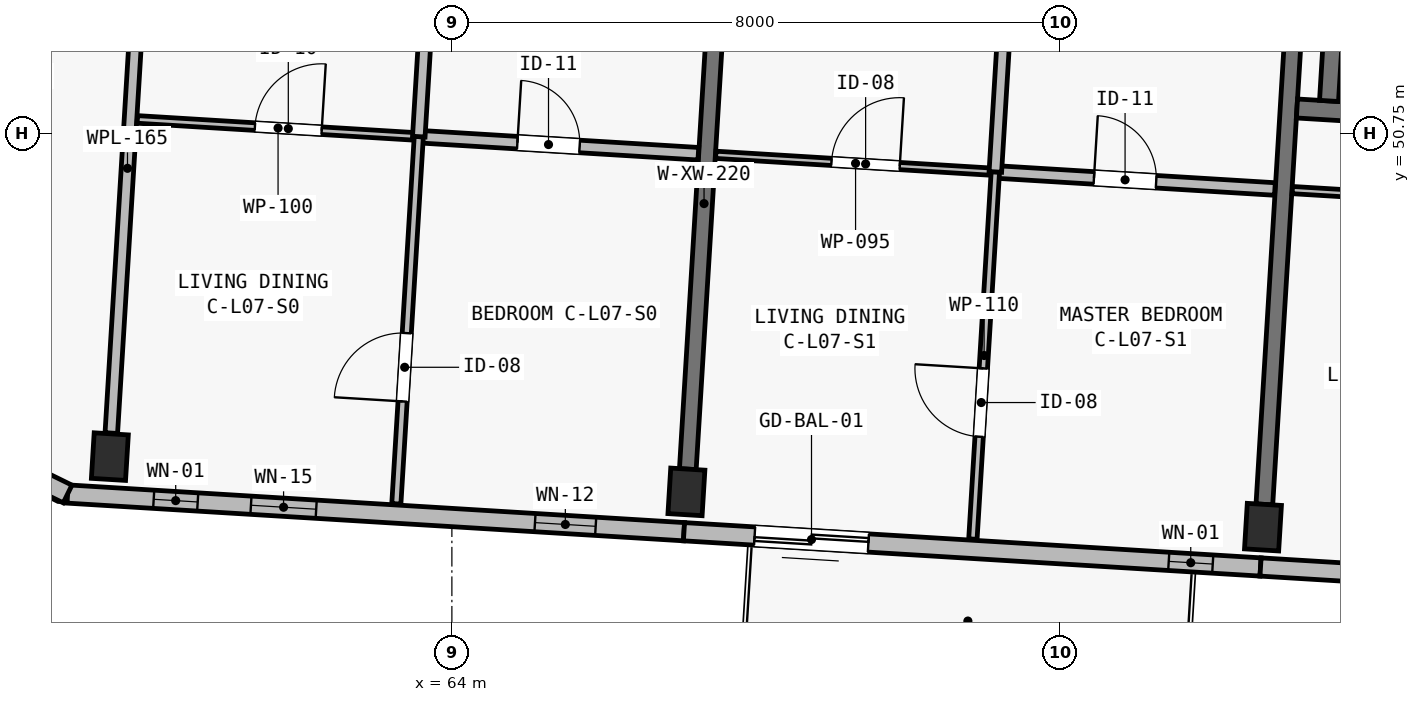
"""IFC4 building model, lengths in metres.
Left out: names, types, materials, properties, quantities, classifications, styles, units other than length and angle.
Written with IfcOpenShell. Run it as: python <this file> out.ifc"""

import sys

from ifc_helpers import new_model, si_unit, direction, frame, frame_2d, origin, origin_2d, place, context, subcontext, project, spatial, rectangle, extrude, element, fill, save


model = new_model("IFC4")
c1 = context("Model", 3, precision=1e-05, world=origin(), true_north=direction((0.0, 1.0)))
c2 = subcontext(c1, "Body", "Model", "MODEL_VIEW")
j1 = project(units=[si_unit("LENGTHUNIT", "METRE"), si_unit("PLANEANGLEUNIT", "RADIAN")], contexts=[c1])
p1 = place(None, origin())
s1 = spatial("IfcSite", under=j1, at=p1, CompositionType="ELEMENT")
p2 = place(p1, origin())
s2 = spatial("IfcBuilding", under=s1, at=p2, CompositionType="ELEMENT")
p3 = place(p2, frame((0.0, 0.0, 24.65)))
s3 = spatial("IfcBuildingStorey", under=s2, at=p3, CompositionType="ELEMENT", Elevation=24.65)
for number, where, z_axis, x_axis in (
    (1, (59.5, 46.5, 0.0), (0.0, 0.0, 1.0), (0.998, -0.061, 0.0)),
    (2, (67.086, 46.036, 0.0), (0.0, 0.0, 1.0), (0.998, -0.061, 0.0)),
    (3, (74.672, 45.572, 0.0), (0.0, 0.0, 1.0), (0.998, -0.061, 0.0)),
):
    element("IfcColumn", number, at=place(p3, frame(where, z_axis=z_axis, x_axis=x_axis)), inside=s3, PredefinedType="COLUMN", context=c2, shape_type="SweptSolid", body=[
        extrude(rectangle(XDim=0.45, YDim=0.6, at=origin_2d()), origin(), (0.0, 0.0, 1.0), 3.25),
    ])
p4 = place(p3, frame((67.104, 46.335, 0.0), z_axis=(0.0, 0.0, 1.0), x_axis=(0.061034188237, 0.998135676081, 0.0)))
e4 = element("IfcWall", 4, at=p4, inside=s3, PredefinedType="SHEAR", context=c2, shape_type="SweptSolid", body=[
    extrude(rectangle(XDim=7.0, YDim=0.22, at=frame_2d((3.5, 0.0))), origin(), (0.0, 0.0, 1.0), 2.5),
])
p5 = place(p3, frame((74.69, 45.872, 0.0), z_axis=(0.0, 0.0, 1.0), x_axis=(0.061036313012, 0.998135546153, 0.0)))
e5 = element("IfcWall", 5, at=p5, inside=s3, PredefinedType="SHEAR", context=c2, shape_type="SweptSolid", body=[
    extrude(rectangle(XDim=7.0, YDim=0.22, at=frame_2d((3.5, 0.0))), origin(), (0.0, 0.0, 1.0), 2.5),
])
p6 = place(p3, frame((75.119, 51.08, 0.0), z_axis=(0.0, 0.0, 1.0), x_axis=(0.998133370443, -0.061071882298, 0.0)))
e6 = element("IfcWall", 6, at=p6, inside=s3, PredefinedType="SHEAR", context=c2, shape_type="SweptSolid", body=[
    extrude(rectangle(XDim=2.99, YDim=0.25, at=frame_2d((1.495, 0.0))), origin(), (0.0, 0.0, 1.0), 3.25),
])
p7 = place(p3, frame((75.541, 51.179, 0.0), z_axis=(0.0, 0.0, 1.0), x_axis=(0.061037062968, 0.998135500293, 0.0)))
e7 = element("IfcWall", 7, at=p7, inside=s3, PredefinedType="SHEAR", context=c2, shape_type="SweptSolid", body=[
    extrude(rectangle(XDim=1.7, YDim=0.25, at=frame_2d((0.85, 0.0))), origin(), (0.0, 0.0, 1.0), 3.25),
])
p8 = place(p3, frame((67.054, 45.512, 0.0), z_axis=(0.0, 0.0, 1.0), x_axis=(-0.998134248939, 0.061057522844, 0.0)))
e8 = element("IfcWall", 8, at=p8, inside=s3, PredefinedType="SOLIDWALL", context=c2, shape_type="SweptSolid", body=[
    extrude(rectangle(XDim=8.125, YDim=0.24, at=frame_2d((4.062, 0.0))), origin(), (0.0, 0.0, 1.0), 3.0),
])
p9 = place(p8, frame((1.164, 0.0, 0.48)))
e9 = element("IfcOpeningElement", 9, at=p9, cuts=e8, PredefinedType="OPENING", context=c2, shape_type="SweptSolid", body=[
    extrude(rectangle(XDim=0.8, YDim=2.3, at=frame_2d((0.4, 1.15))), frame((0.0, 0.135, 0.0), z_axis=(0.0, -1.0, 0.0), x_axis=(1.0, 0.0, 0.0)), (0.0, 0.0, 1.0), 0.27),
])
p10 = place(p8, frame((4.848, 0.0, 0.48)))
e10 = element("IfcOpeningElement", 10, at=p10, cuts=e8, PredefinedType="OPENING", context=c2, shape_type="SweptSolid", body=[
    extrude(rectangle(XDim=0.86, YDim=2.36, at=frame_2d((0.43, 1.18))), frame((0.0, 0.135, 0.0), z_axis=(0.0, -1.0, 0.0), x_axis=(1.0, 0.0, 0.0)), (0.0, 0.0, 1.0), 0.27),
])
p11 = place(p8, frame((6.41, 0.0, 0.52)))
e11 = element("IfcOpeningElement", 11, at=p11, cuts=e8, PredefinedType="OPENING", context=c2, shape_type="SweptSolid", body=[
    extrude(rectangle(XDim=0.58, YDim=2.16, at=frame_2d((0.29, 1.08))), frame((0.0, 0.135, 0.0), z_axis=(0.0, -1.0, 0.0), x_axis=(1.0, 0.0, 0.0)), (0.0, 0.0, 1.0), 0.27),
])
p12 = place(p3, frame((74.64, 45.048, 0.0), z_axis=(0.0, 0.0, 1.0), x_axis=(-0.998135669243, 0.061034300063, 0.0)))
e12 = element("IfcWall", 12, at=p12, inside=s3, PredefinedType="SOLIDWALL", context=c2, shape_type="SweptSolid", body=[
    extrude(rectangle(XDim=7.6, YDim=0.24, at=frame_2d((3.8, 0.0))), origin(), (0.0, 0.0, 1.0), 3.0),
])
p13 = place(p12, frame((5.169, 0.0, 0.0)))
e13 = element("IfcOpeningElement", 13, at=p13, cuts=e12, PredefinedType="OPENING", context=c2, shape_type="SweptSolid", body=[
    extrude(rectangle(XDim=1.5, YDim=2.12, at=frame_2d((0.75, 1.06))), frame((0.0, 0.135, 0.0), z_axis=(0.0, -1.0, 0.0), x_axis=(1.0, 0.0, 0.0)), (0.0, 0.0, 1.0), 0.27),
])
p14 = place(p12, frame((0.63, 0.0, 0.5)))
e14 = element("IfcOpeningElement", 14, at=p14, cuts=e12, PredefinedType="OPENING", context=c2, shape_type="SweptSolid", body=[
    extrude(rectangle(XDim=0.58, YDim=2.16, at=frame_2d((0.29, 1.08))), frame((0.0, 0.135, 0.0), z_axis=(0.0, -1.0, 0.0), x_axis=(1.0, 0.0, 0.0)), (0.0, 0.0, 1.0), 0.27),
])
p15 = place(p3, frame((82.225, 44.584, 0.0), z_axis=(0.0, 0.0, 1.0), x_axis=(-0.998133591969, 0.061068261669, 0.0)))
e15 = element("IfcWall", 15, at=p15, inside=s3, PredefinedType="SOLIDWALL", context=c2, shape_type="SweptSolid", body=[
    extrude(rectangle(XDim=7.6, YDim=0.24, at=frame_2d((3.8, 0.0))), origin(), (0.0, 0.0, 1.0), 3.0),
])
p16 = place(p15, frame((0.878, 0.0, 0.42)))
e16 = element("IfcOpeningElement", 16, at=p16, cuts=e15, PredefinedType="OPENING", context=c2, shape_type="SweptSolid", body=[
    extrude(rectangle(XDim=0.7, YDim=2.36, at=frame_2d((0.35, 1.18))), frame((0.0, 0.135, 0.0), z_axis=(0.0, -1.0, 0.0), x_axis=(1.0, 0.0, 0.0)), (0.0, 0.0, 1.0), 0.27),
])
p17 = place(p15, frame((3.247, 0.0, 0.42)))
e17 = element("IfcOpeningElement", 17, at=p17, cuts=e15, PredefinedType="OPENING", context=c2, shape_type="SweptSolid", body=[
    extrude(rectangle(XDim=0.76, YDim=2.34, at=frame_2d((0.38, 1.17))), frame((0.0, 0.135, 0.0), z_axis=(0.0, -1.0, 0.0), x_axis=(1.0, 0.0, 0.0)), (0.0, 0.0, 1.0), 0.27),
])
p18 = place(p3, frame((58.944, 46.008, 0.0), z_axis=(0.0, 0.0, 1.0), x_axis=(-0.897775054318, 0.440454256246, 0.0)))
e18 = element("IfcWall", 18, at=p18, inside=s3, PredefinedType="SOLIDWALL", context=c2, shape_type="SweptSolid", body=[
    extrude(rectangle(XDim=8.12, YDim=0.26, at=frame_2d((4.06, 0.0))), origin(), (0.0, 0.0, 1.0), 3.0),
])
p19 = place(p18, frame((2.99, 0.0, 0.52)))
e19 = element("IfcOpeningElement", 19, at=p19, cuts=e18, PredefinedType="OPENING", context=c2, shape_type="SweptSolid", body=[
    extrude(rectangle(XDim=0.64, YDim=2.18, at=frame_2d((0.32, 1.09))), frame((0.0, 0.145, 0.0), z_axis=(0.0, -1.0, 0.0), x_axis=(1.0, 0.0, 0.0)), (0.0, 0.0, 1.0), 0.29),
])
p20 = place(p18, frame((4.71, 0.0, 0.45)))
e20 = element("IfcOpeningElement", 20, at=p20, cuts=e18, PredefinedType="OPENING", context=c2, shape_type="SweptSolid", body=[
    extrude(rectangle(XDim=0.78, YDim=2.2, at=frame_2d((0.39, 1.1))), frame((0.0, 0.145, 0.0), z_axis=(0.0, -1.0, 0.0), x_axis=(1.0, 0.0, 0.0)), (0.0, 0.0, 1.0), 0.29),
])
p21 = place(p3, frame((51.654, 49.585, 0.0), z_axis=(0.0, 0.0, 1.0), x_axis=(0.448621989068, 0.893721607059, 0.0)))
e21 = element("IfcWall", 21, at=p21, inside=s3, PredefinedType="SOLIDWALL", context=c2, shape_type="SweptSolid", body=[
    extrude(rectangle(XDim=19.061, YDim=0.26, at=frame_2d((9.53, 0.0))), origin(), (0.0, 0.0, 1.0), 3.0),
])
p22 = place(p21, frame((2.99, 0.0, 0.52)))
e22 = element("IfcOpeningElement", 22, at=p22, cuts=e21, PredefinedType="OPENING", context=c2, shape_type="SweptSolid", body=[
    extrude(rectangle(XDim=0.64, YDim=2.18, at=frame_2d((0.32, 1.09))), frame((0.0, 0.145, 0.0), z_axis=(0.0, -1.0, 0.0), x_axis=(1.0, 0.0, 0.0)), (0.0, 0.0, 1.0), 0.29),
])
p23 = place(p21, frame((15.65, 0.0, 0.45)))
e23 = element("IfcOpeningElement", 23, at=p23, cuts=e21, PredefinedType="OPENING", context=c2, shape_type="SweptSolid", body=[
    extrude(rectangle(XDim=0.78, YDim=2.2, at=frame_2d((0.39, 1.1))), frame((0.0, 0.145, 0.0), z_axis=(0.0, -1.0, 0.0), x_axis=(1.0, 0.0, 0.0)), (0.0, 0.0, 1.0), 0.29),
])
p24 = place(p3, frame((59.519, 46.809, 0.0), z_axis=(0.0, 0.0, 1.0), x_axis=(0.061034681366, 0.998135645927, 0.0)))
e24 = element("IfcWall", 24, at=p24, inside=s3, PredefinedType="PLUMBINGWALL", context=c2, shape_type="SweptSolid", body=[
    extrude(rectangle(XDim=6.98, YDim=0.165, at=frame_2d((3.49, 0.0))), origin(), (0.0, 0.0, 1.0), 2.5),
])
p25 = place(p3, frame((59.862, 50.936, 0.0), z_axis=(0.0, 0.0, 1.0), x_axis=(0.998133653934, -0.061067248869, 0.0)))
e25 = element("IfcWall", 25, at=p25, inside=s3, PredefinedType="PARTITIONING", context=c2, shape_type="SweptSolid", body=[
    extrude(rectangle(XDim=3.71, YDim=0.1, at=frame_2d((1.855, 0.0))), origin(), (0.0, 0.0, 1.0), 2.97),
])
p26 = place(p25, frame((1.55, 0.0, 0.0)))
e26 = element("IfcOpeningElement", 26, at=p26, cuts=e25, PredefinedType="OPENING", context=c2, shape_type="SweptSolid", body=[
    extrude(rectangle(XDim=0.88, YDim=2.1, at=frame_2d((0.44, 1.05))), frame((0.0, 0.065, 0.0), z_axis=(0.0, -1.0, 0.0), x_axis=(1.0, 0.0, 0.0)), (0.0, 0.0, 1.0), 0.13),
])
p27 = place(p3, frame((63.565, 50.71, 0.0), z_axis=(0.0, 0.0, 1.0), x_axis=(0.998136472989, -0.061021154439, 0.0)))
e27 = element("IfcWall", 27, at=p27, inside=s3, PredefinedType="PLUMBINGWALL", context=c2, shape_type="SweptSolid", body=[
    extrude(rectangle(XDim=3.685, YDim=0.165, at=frame_2d((1.842, 0.0))), origin(), (0.0, 0.0, 1.0), 2.97),
])
p28 = place(p27, frame((1.3, 0.0, 0.0)))
e28 = element("IfcOpeningElement", 28, at=p28, cuts=e27, PredefinedType="OPENING", context=c2, shape_type="SweptSolid", body=[
    extrude(rectangle(XDim=0.82, YDim=2.08, at=frame_2d((0.41, 1.04))), frame((0.0, 0.097, 0.0), z_axis=(0.0, -1.0, 0.0), x_axis=(1.0, 0.0, 0.0)), (0.0, 0.0, 1.0), 0.195),
])
p29 = place(p3, frame((63.269, 45.879, 0.0), z_axis=(0.0, 0.0, 1.0), x_axis=(0.061084424005, 0.998132602986, 0.0)))
e29 = element("IfcWall", 29, at=p29, inside=s3, PredefinedType="PARTITIONING", context=c2, shape_type="SweptSolid", body=[
    extrude(rectangle(XDim=4.84, YDim=0.12, at=frame_2d((2.42, 0.0))), origin(), (0.0, 0.0, 1.0), 2.97),
])
p30 = place(p29, frame((1.35, 0.0, 0.0)))
e30 = element("IfcOpeningElement", 30, at=p30, cuts=e29, PredefinedType="OPENING", context=c2, shape_type="SweptSolid", body=[
    extrude(rectangle(XDim=0.9, YDim=2.1, at=frame_2d((0.45, 1.05))), frame((0.0, 0.075, 0.0), z_axis=(0.0, -1.0, 0.0), x_axis=(1.0, 0.0, 0.0)), (0.0, 0.0, 1.0), 0.15),
])
p31 = place(p3, frame((63.565, 50.71, 0.0), z_axis=(0.0, 0.0, 1.0), x_axis=(0.06100299582, 0.998137582952, 0.0)))
e31 = element("IfcWall", 31, at=p31, inside=s3, PredefinedType="PLUMBINGWALL", context=c2, shape_type="SweptSolid", body=[
    extrude(rectangle(XDim=3.57, YDim=0.165, at=frame_2d((1.785, 0.0))), origin(), (0.0, 0.0, 1.0), 2.97),
])
p32 = place(p3, frame((67.472, 50.471, 0.0), z_axis=(0.0, 0.0, 1.0), x_axis=(0.998136719672, -0.061017119263, 0.0)))
e32 = element("IfcWall", 32, at=p32, inside=s3, PredefinedType="PARTITIONING", context=c2, shape_type="SweptSolid", body=[
    extrude(rectangle(XDim=3.685, YDim=0.095, at=frame_2d((1.843, 0.0))), origin(), (0.0, 0.0, 1.0), 2.97),
])
p33 = place(p32, frame((1.525, 0.0, 0.0)))
e33 = element("IfcOpeningElement", 33, at=p33, cuts=e32, PredefinedType="OPENING", context=c2, shape_type="SweptSolid", body=[
    extrude(rectangle(XDim=0.9, YDim=2.1, at=frame_2d((0.45, 1.05))), frame((0.0, 0.062, 0.0), z_axis=(0.0, -1.0, 0.0), x_axis=(1.0, 0.0, 0.0)), (0.0, 0.0, 1.0), 0.125),
])
p34 = place(p3, frame((71.15, 50.246, 0.0), z_axis=(0.0, 0.0, 1.0), x_axis=(0.998132682596, -0.061083123148, 0.0)))
e34 = element("IfcWall", 34, at=p34, inside=s3, PredefinedType="PLUMBINGWALL", context=c2, shape_type="SweptSolid", body=[
    extrude(rectangle(XDim=3.685, YDim=0.165, at=frame_2d((1.843, 0.0))), origin(), (0.0, 0.0, 1.0), 2.97),
])
p35 = place(p34, frame((1.3, 0.0, 0.0)))
e35 = element("IfcOpeningElement", 35, at=p35, cuts=e34, PredefinedType="OPENING", context=c2, shape_type="SweptSolid", body=[
    extrude(rectangle(XDim=0.82, YDim=2.08, at=frame_2d((0.41, 1.04))), frame((0.0, 0.097, 0.0), z_axis=(0.0, -1.0, 0.0), x_axis=(1.0, 0.0, 0.0)), (0.0, 0.0, 1.0), 0.195),
])
p36 = place(p3, frame((70.855, 45.415, 0.0), z_axis=(0.0, 0.0, 1.0), x_axis=(0.061034170677, 0.998135677155, 0.0)))
e36 = element("IfcWall", 36, at=p36, inside=s3, PredefinedType="PARTITIONING", context=c2, shape_type="SweptSolid", body=[
    extrude(rectangle(XDim=4.84, YDim=0.11, at=frame_2d((2.42, 0.0))), origin(), (0.0, 0.0, 1.0), 2.97),
])
p37 = place(p36, frame((1.35, 0.0, 0.0)))
e37 = element("IfcOpeningElement", 37, at=p37, cuts=e36, PredefinedType="OPENING", context=c2, shape_type="SweptSolid", body=[
    extrude(rectangle(XDim=0.9, YDim=2.1, at=frame_2d((0.45, 1.05))), frame((0.0, 0.07, 0.0), z_axis=(0.0, -1.0, 0.0), x_axis=(1.0, 0.0, 0.0)), (0.0, 0.0, 1.0), 0.14),
])
p38 = place(p3, frame((71.15, 50.246, 0.0), z_axis=(0.0, 0.0, 1.0), x_axis=(0.061071129902, 0.998133416479, 0.0)))
e38 = element("IfcWall", 38, at=p38, inside=s3, PredefinedType="PLUMBINGWALL", context=c2, shape_type="SweptSolid", body=[
    extrude(rectangle(XDim=3.57, YDim=0.165, at=frame_2d((1.785, 0.0))), origin(), (0.0, 0.0, 1.0), 2.97),
])
p39 = place(p3, frame((75.058, 50.007, 0.0), z_axis=(0.0, 0.0, 1.0), x_axis=(0.998132708268, -0.061082703655, 0.0)))
e39 = element("IfcWall", 39, at=p39, inside=s3, PredefinedType="PARTITIONING", context=c2, shape_type="SweptSolid", body=[
    extrude(rectangle(XDim=5.08, YDim=0.095, at=frame_2d((2.54, 0.0))), origin(), (0.0, 0.0, 1.0), 2.97),
])
p40 = place(p39, frame((3.595, 0.0, 0.0)))
e40 = element("IfcOpeningElement", 40, at=p40, cuts=e39, PredefinedType="OPENING", context=c2, shape_type="SweptSolid", body=[
    extrude(rectangle(XDim=0.9, YDim=2.1, at=frame_2d((0.45, 1.05))), frame((0.0, 0.062, 0.0), z_axis=(0.0, -1.0, 0.0), x_axis=(1.0, 0.0, 0.0)), (0.0, 0.0, 1.0), 0.125),
])
p41 = place(p9, origin())
e41 = element("IfcWindow", 41, at=p41, inside=s3, PartitioningType="SINGLE_PANEL", PredefinedType="WINDOW", context=c2, shape_type="SweptSolid", body=[
    extrude(rectangle(XDim=0.8, YDim=2.3, at=frame_2d((0.4, 1.15))), frame((0.0, 0.03, 0.0), z_axis=(0.0, -1.0, 0.0), x_axis=(1.0, 0.0, 0.0)), (0.0, 0.0, 1.0), 0.06),
])
fill(e9, e41)
p42 = place(p10, origin())
e42 = element("IfcWindow", 42, at=p42, inside=s3, PartitioningType="SINGLE_PANEL", PredefinedType="WINDOW", context=c2, shape_type="SweptSolid", body=[
    extrude(rectangle(XDim=0.86, YDim=2.36, at=frame_2d((0.43, 1.18))), frame((0.0, 0.03, 0.0), z_axis=(0.0, -1.0, 0.0), x_axis=(1.0, 0.0, 0.0)), (0.0, 0.0, 1.0), 0.06),
])
fill(e10, e42)
p43 = place(p11, origin())
e43 = element("IfcWindow", 43, at=p43, inside=s3, PartitioningType="SINGLE_PANEL", PredefinedType="WINDOW", context=c2, shape_type="SweptSolid", body=[
    extrude(rectangle(XDim=0.58, YDim=2.16, at=frame_2d((0.29, 1.08))), frame((0.0, 0.03, 0.0), z_axis=(0.0, -1.0, 0.0), x_axis=(1.0, 0.0, 0.0)), (0.0, 0.0, 1.0), 0.06),
])
fill(e11, e43)
p44 = place(p13, origin())
e44 = element("IfcDoor", 44, at=p44, inside=s3, OperationType="SLIDING_TO_RIGHT", PredefinedType="DOOR", context=c2, shape_type="SweptSolid", body=[
    extrude(rectangle(XDim=1.5, YDim=2.12, at=frame_2d((0.75, 1.06))), frame((0.0, 0.025, 0.0), z_axis=(0.0, -1.0, 0.0), x_axis=(1.0, 0.0, 0.0)), (0.0, 0.0, 1.0), 0.05),
])
fill(e13, e44)
p45 = place(p14, origin())
e45 = element("IfcWindow", 45, at=p45, inside=s3, PartitioningType="SINGLE_PANEL", PredefinedType="WINDOW", context=c2, shape_type="SweptSolid", body=[
    extrude(rectangle(XDim=0.58, YDim=2.16, at=frame_2d((0.29, 1.08))), frame((0.0, 0.03, 0.0), z_axis=(0.0, -1.0, 0.0), x_axis=(1.0, 0.0, 0.0)), (0.0, 0.0, 1.0), 0.06),
])
fill(e14, e45)
p46 = place(p26, origin())
e46 = element("IfcDoor", 46, at=p46, inside=s3, OperationType="SINGLE_SWING_RIGHT", PredefinedType="DOOR", context=c2, shape_type="SweptSolid", body=[
    extrude(rectangle(XDim=0.88, YDim=2.1, at=frame_2d((0.44, 1.05))), frame((0.0, 0.025, 0.0), z_axis=(0.0, -1.0, 0.0), x_axis=(1.0, 0.0, 0.0)), (0.0, 0.0, 1.0), 0.05),
])
fill(e26, e46)
p47 = place(p28, origin())
e47 = element("IfcDoor", 47, at=p47, inside=s3, OperationType="SINGLE_SWING_LEFT", PredefinedType="DOOR", context=c2, shape_type="SweptSolid", body=[
    extrude(rectangle(XDim=0.82, YDim=2.08, at=frame_2d((0.41, 1.04))), frame((0.0, 0.025, 0.0), z_axis=(0.0, -1.0, 0.0), x_axis=(1.0, 0.0, 0.0)), (0.0, 0.0, 1.0), 0.05),
])
fill(e28, e47)
p48 = place(p30, origin())
e48 = element("IfcDoor", 48, at=p48, inside=s3, OperationType="SINGLE_SWING_LEFT", PredefinedType="DOOR", context=c2, shape_type="SweptSolid", body=[
    extrude(rectangle(XDim=0.9, YDim=2.1, at=frame_2d((0.45, 1.05))), frame((0.0, 0.025, 0.0), z_axis=(0.0, -1.0, 0.0), x_axis=(1.0, 0.0, 0.0)), (0.0, 0.0, 1.0), 0.05),
])
fill(e30, e48)
p49 = place(p33, origin())
e49 = element("IfcDoor", 49, at=p49, inside=s3, OperationType="SINGLE_SWING_RIGHT", PredefinedType="DOOR", context=c2, shape_type="SweptSolid", body=[
    extrude(rectangle(XDim=0.9, YDim=2.1, at=frame_2d((0.45, 1.05))), frame((0.0, 0.025, 0.0), z_axis=(0.0, -1.0, 0.0), x_axis=(1.0, 0.0, 0.0)), (0.0, 0.0, 1.0), 0.05),
])
fill(e33, e49)
p50 = place(p35, origin())
e50 = element("IfcDoor", 50, at=p50, inside=s3, OperationType="SINGLE_SWING_LEFT", PredefinedType="DOOR", context=c2, shape_type="SweptSolid", body=[
    extrude(rectangle(XDim=0.82, YDim=2.08, at=frame_2d((0.41, 1.04))), frame((0.0, 0.025, 0.0), z_axis=(0.0, -1.0, 0.0), x_axis=(1.0, 0.0, 0.0)), (0.0, 0.0, 1.0), 0.05),
])
fill(e35, e50)
p51 = place(p37, origin())
e51 = element("IfcDoor", 51, at=p51, inside=s3, OperationType="SINGLE_SWING_RIGHT", PredefinedType="DOOR", context=c2, shape_type="SweptSolid", body=[
    extrude(rectangle(XDim=0.9, YDim=2.1, at=frame_2d((0.45, 1.05))), frame((0.0, 0.025, 0.0), z_axis=(0.0, -1.0, 0.0), x_axis=(1.0, 0.0, 0.0)), (0.0, 0.0, 1.0), 0.05),
])
fill(e37, e51)
save(model, sys.argv[1])
